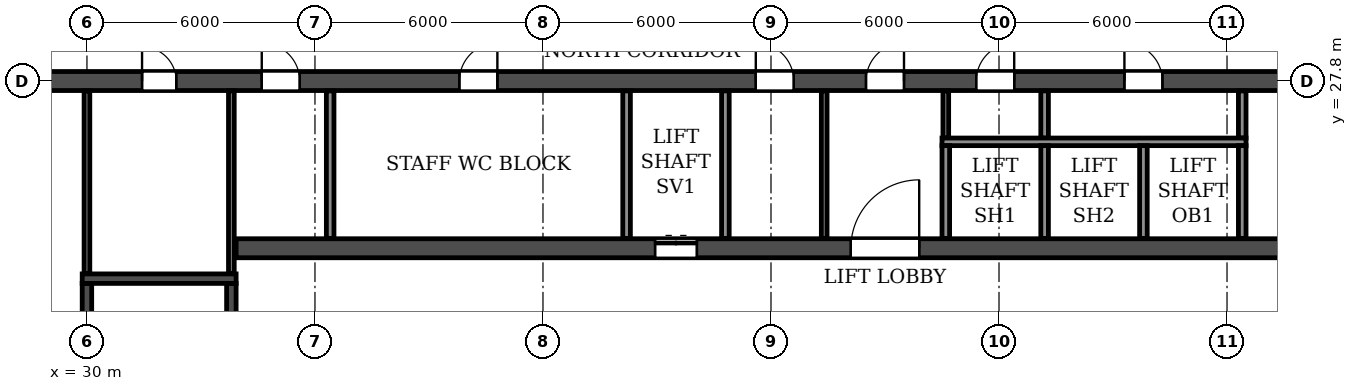
"""IFC4 building model, lengths in metres.
Left out: names, types, materials, properties, quantities, classifications, styles, units other than length and angle.
Written with IfcOpenShell. Run it as: python <this file> out.ifc"""

import sys

from ifc_helpers import new_model, si_unit, direction, frame, frame_2d, origin, place, context, subcontext, project, spatial, rectangle, extrude, element, fill, save


model = new_model("IFC4")
c1 = context("Model", 3, precision=1e-05, world=origin(), true_north=direction((0.0, 1.0)))
c2 = subcontext(c1, "Body", "Model", "MODEL_VIEW")
j1 = project(units=[si_unit("LENGTHUNIT", "METRE"), si_unit("PLANEANGLEUNIT", "RADIAN")], contexts=[c1])
p1 = place(None, origin())
s1 = spatial("IfcSite", under=j1, at=p1, CompositionType="ELEMENT")
p2 = place(p1, origin())
s2 = spatial("IfcBuilding", under=s1, at=p2, CompositionType="ELEMENT")
p3 = place(p2, frame((0.0, 0.0, 76.2)))
s3 = spatial("IfcBuildingStorey", under=s2, at=p3, CompositionType="ELEMENT", Elevation=76.2)
p4 = place(p3, frame((8.6, 27.8, 0.0), z_axis=(0.0, 0.0, 1.0), x_axis=(1.0, 0.0, 0.0)))
e1 = element("IfcWall", 1, at=p4, inside=s3, PredefinedType="SOLIDWALL", context=c2, shape_type="SweptSolid", body=[
    extrude(rectangle(XDim=84.8, YDim=0.5, at=frame_2d((42.4, 0.0))), origin(), (0.0, 0.0, 1.0), 3.06),
])
p5 = place(p4, frame((2.0, 0.0, 0.0)))
e2 = element("IfcOpeningElement", 2, at=p5, cuts=e1, PredefinedType="OPENING", context=c2, shape_type="SweptSolid", body=[
    extrude(rectangle(XDim=1.5, YDim=2.1, at=frame_2d((0.75, 1.05))), frame((0.0, 0.26, 0.0), z_axis=(0.0, -1.0, 0.0), x_axis=(1.0, 0.0, 0.0)), (0.0, 0.0, 1.0), 0.52),
])
p6 = place(p4, frame((6.95, 0.0, 0.0)))
e3 = element("IfcOpeningElement", 3, at=p6, cuts=e1, PredefinedType="OPENING", context=c2, shape_type="SweptSolid", body=[
    extrude(rectangle(XDim=1.0, YDim=2.1, at=frame_2d((0.5, 1.05))), frame((0.0, 0.26, 0.0), z_axis=(0.0, -1.0, 0.0), x_axis=(1.0, 0.0, 0.0)), (0.0, 0.0, 1.0), 0.52),
])
p7 = place(p4, frame((10.3, 0.0, 0.0)))
e4 = element("IfcOpeningElement", 4, at=p7, cuts=e1, PredefinedType="OPENING", context=c2, shape_type="SweptSolid", body=[
    extrude(rectangle(XDim=1.0, YDim=2.1, at=frame_2d((0.5, 1.05))), frame((0.0, 0.26, 0.0), z_axis=(0.0, -1.0, 0.0), x_axis=(1.0, 0.0, 0.0)), (0.0, 0.0, 1.0), 0.52),
])
p8 = place(p4, frame((13.65, 0.0, 0.0)))
e5 = element("IfcOpeningElement", 5, at=p8, cuts=e1, PredefinedType="OPENING", context=c2, shape_type="SweptSolid", body=[
    extrude(rectangle(XDim=0.9, YDim=2.1, at=frame_2d((0.45, 1.05))), frame((0.0, 0.26, 0.0), z_axis=(0.0, -1.0, 0.0), x_axis=(1.0, 0.0, 0.0)), (0.0, 0.0, 1.0), 0.52),
])
p9 = place(p4, frame((22.85, 0.0, 0.0)))
e6 = element("IfcOpeningElement", 6, at=p9, cuts=e1, PredefinedType="OPENING", context=c2, shape_type="SweptSolid", body=[
    extrude(rectangle(XDim=0.9, YDim=2.1, at=frame_2d((0.45, 1.05))), frame((0.0, 0.26, 0.0), z_axis=(0.0, -1.0, 0.0), x_axis=(1.0, 0.0, 0.0)), (0.0, 0.0, 1.0), 0.52),
])
p10 = place(p4, frame((26.0, 0.0, 0.0)))
e7 = element("IfcOpeningElement", 7, at=p10, cuts=e1, PredefinedType="OPENING", context=c2, shape_type="SweptSolid", body=[
    extrude(rectangle(XDim=1.0, YDim=2.1, at=frame_2d((0.5, 1.05))), frame((0.0, 0.26, 0.0), z_axis=(0.0, -1.0, 0.0), x_axis=(1.0, 0.0, 0.0)), (0.0, 0.0, 1.0), 0.52),
])
p11 = place(p4, frame((31.2, 0.0, 0.0)))
e8 = element("IfcOpeningElement", 8, at=p11, cuts=e1, PredefinedType="OPENING", context=c2, shape_type="SweptSolid", body=[
    extrude(rectangle(XDim=1.0, YDim=2.1, at=frame_2d((0.5, 1.05))), frame((0.0, 0.26, 0.0), z_axis=(0.0, -1.0, 0.0), x_axis=(1.0, 0.0, 0.0)), (0.0, 0.0, 1.0), 0.52),
])
p12 = place(p4, frame((39.0, 0.0, 0.0)))
e9 = element("IfcOpeningElement", 9, at=p12, cuts=e1, PredefinedType="OPENING", context=c2, shape_type="SweptSolid", body=[
    extrude(rectangle(XDim=1.0, YDim=2.1, at=frame_2d((0.5, 1.05))), frame((0.0, 0.26, 0.0), z_axis=(0.0, -1.0, 0.0), x_axis=(1.0, 0.0, 0.0)), (0.0, 0.0, 1.0), 0.52),
])
p13 = place(p4, frame((41.9, 0.0, 0.0)))
e10 = element("IfcOpeningElement", 10, at=p13, cuts=e1, PredefinedType="OPENING", context=c2, shape_type="SweptSolid", body=[
    extrude(rectangle(XDim=1.0, YDim=2.1, at=frame_2d((0.5, 1.05))), frame((0.0, 0.26, 0.0), z_axis=(0.0, -1.0, 0.0), x_axis=(1.0, 0.0, 0.0)), (0.0, 0.0, 1.0), 0.52),
])
p14 = place(p4, frame((44.8, 0.0, 0.0)))
e11 = element("IfcOpeningElement", 11, at=p14, cuts=e1, PredefinedType="OPENING", context=c2, shape_type="SweptSolid", body=[
    extrude(rectangle(XDim=1.0, YDim=2.1, at=frame_2d((0.5, 1.05))), frame((0.0, 0.26, 0.0), z_axis=(0.0, -1.0, 0.0), x_axis=(1.0, 0.0, 0.0)), (0.0, 0.0, 1.0), 0.52),
])
p15 = place(p4, frame((48.7, 0.0, 0.0)))
e12 = element("IfcOpeningElement", 12, at=p15, cuts=e1, PredefinedType="OPENING", context=c2, shape_type="SweptSolid", body=[
    extrude(rectangle(XDim=1.0, YDim=2.1, at=frame_2d((0.5, 1.05))), frame((0.0, 0.26, 0.0), z_axis=(0.0, -1.0, 0.0), x_axis=(1.0, 0.0, 0.0)), (0.0, 0.0, 1.0), 0.52),
])
p16 = place(p4, frame((55.2, 0.0, 0.0)))
e13 = element("IfcOpeningElement", 13, at=p16, cuts=e1, PredefinedType="OPENING", context=c2, shape_type="SweptSolid", body=[
    extrude(rectangle(XDim=1.0, YDim=2.1, at=frame_2d((0.5, 1.05))), frame((0.0, 0.26, 0.0), z_axis=(0.0, -1.0, 0.0), x_axis=(1.0, 0.0, 0.0)), (0.0, 0.0, 1.0), 0.52),
])
p17 = place(p4, frame((61.05, 0.0, 0.0)))
e14 = element("IfcOpeningElement", 14, at=p17, cuts=e1, PredefinedType="OPENING", context=c2, shape_type="SweptSolid", body=[
    extrude(rectangle(XDim=0.9, YDim=2.1, at=frame_2d((0.45, 1.05))), frame((0.0, 0.26, 0.0), z_axis=(0.0, -1.0, 0.0), x_axis=(1.0, 0.0, 0.0)), (0.0, 0.0, 1.0), 0.52),
])
p18 = place(p4, frame((70.25, 0.0, 0.0)))
e15 = element("IfcOpeningElement", 15, at=p18, cuts=e1, PredefinedType="OPENING", context=c2, shape_type="SweptSolid", body=[
    extrude(rectangle(XDim=0.9, YDim=2.1, at=frame_2d((0.45, 1.05))), frame((0.0, 0.26, 0.0), z_axis=(0.0, -1.0, 0.0), x_axis=(1.0, 0.0, 0.0)), (0.0, 0.0, 1.0), 0.52),
])
p19 = place(p4, frame((73.5, 0.0, 0.0)))
e16 = element("IfcOpeningElement", 16, at=p19, cuts=e1, PredefinedType="OPENING", context=c2, shape_type="SweptSolid", body=[
    extrude(rectangle(XDim=1.0, YDim=2.1, at=frame_2d((0.5, 1.05))), frame((0.0, 0.26, 0.0), z_axis=(0.0, -1.0, 0.0), x_axis=(1.0, 0.0, 0.0)), (0.0, 0.0, 1.0), 0.52),
])
p20 = place(p4, frame((76.25, 0.0, 0.0)))
e17 = element("IfcOpeningElement", 17, at=p20, cuts=e1, PredefinedType="OPENING", context=c2, shape_type="SweptSolid", body=[
    extrude(rectangle(XDim=1.0, YDim=2.1, at=frame_2d((0.5, 1.05))), frame((0.0, 0.26, 0.0), z_axis=(0.0, -1.0, 0.0), x_axis=(1.0, 0.0, 0.0)), (0.0, 0.0, 1.0), 0.52),
])
p21 = place(p4, frame((80.95, 0.0, 0.0)))
e18 = element("IfcOpeningElement", 18, at=p21, cuts=e1, PredefinedType="OPENING", context=c2, shape_type="SweptSolid", body=[
    extrude(rectangle(XDim=1.0, YDim=2.1, at=frame_2d((0.5, 1.05))), frame((0.0, 0.26, 0.0), z_axis=(0.0, -1.0, 0.0), x_axis=(1.0, 0.0, 0.0)), (0.0, 0.0, 1.0), 0.52),
])
p22 = place(p3, frame((33.925, 23.4, 0.0), z_axis=(0.0, 0.0, 1.0), x_axis=(1.0, 0.0, 0.0)))
e19 = element("IfcWall", 19, at=p22, inside=s3, PredefinedType="SOLIDWALL", context=c2, shape_type="SweptSolid", body=[
    extrude(rectangle(XDim=34.15, YDim=0.5, at=frame_2d((17.075, 0.0))), origin(), (0.0, 0.0, 1.0), 3.06),
])
p23 = place(p22, frame((16.175, 0.0, 0.0)))
e20 = element("IfcOpeningElement", 20, at=p23, cuts=e19, PredefinedType="OPENING", context=c2, shape_type="SweptSolid", body=[
    extrude(rectangle(XDim=1.8, YDim=2.1, at=frame_2d((0.9, 1.05))), frame((0.0, 0.26, 0.0), z_axis=(0.0, -1.0, 0.0), x_axis=(1.0, 0.0, 0.0)), (0.0, 0.0, 1.0), 0.52),
])
p24 = place(p22, frame((11.025, 0.0, 0.0)))
e21 = element("IfcOpeningElement", 21, at=p24, cuts=e19, PredefinedType="OPENING", context=c2, shape_type="SweptSolid", body=[
    extrude(rectangle(XDim=1.1, YDim=2.1, at=frame_2d((0.55, 1.05))), frame((0.0, 0.26, 0.0), z_axis=(0.0, -1.0, 0.0), x_axis=(1.0, 0.0, 0.0)), (0.0, 0.0, 1.0), 0.52),
])
p25 = place(p3, frame((30.0, 14.85, 0.0), z_axis=(0.0, 0.0, 1.0), x_axis=(0.0, 1.0, 0.0)))
e22 = element("IfcWall", 22, at=p25, inside=s3, PredefinedType="SOLIDWALL", context=c2, shape_type="SweptSolid", body=[
    extrude(rectangle(XDim=7.625, YDim=0.25, at=frame_2d((3.812, 0.0))), origin(), (0.0, 0.0, 1.0), 3.06),
])
p26 = place(p3, frame((33.8, 14.85, 0.0), z_axis=(0.0, 0.0, 1.0), x_axis=(0.0, 1.0, 0.0)))
e23 = element("IfcWall", 23, at=p26, inside=s3, PredefinedType="SOLIDWALL", context=c2, shape_type="SweptSolid", body=[
    extrude(rectangle(XDim=7.625, YDim=0.25, at=frame_2d((3.812, 0.0))), origin(), (0.0, 0.0, 1.0), 3.06),
])
p27 = place(p26, frame((0.45, 0.0, 0.0)))
e24 = element("IfcOpeningElement", 24, at=p27, cuts=e23, PredefinedType="OPENING", context=c2, shape_type="SweptSolid", body=[
    extrude(rectangle(XDim=1.0, YDim=2.1, at=frame_2d((0.5, 1.05))), frame((0.0, 0.135, 0.0), z_axis=(0.0, -1.0, 0.0), x_axis=(1.0, 0.0, 0.0)), (0.0, 0.0, 1.0), 0.27),
])
p28 = place(p3, frame((29.875, 22.6, 0.0), z_axis=(0.0, 0.0, 1.0), x_axis=(1.0, 0.0, 0.0)))
e25 = element("IfcWall", 25, at=p28, inside=s3, PredefinedType="SOLIDWALL", context=c2, shape_type="SweptSolid", body=[
    extrude(rectangle(XDim=4.05, YDim=0.25, at=frame_2d((2.025, 0.0))), origin(), (0.0, 0.0, 1.0), 3.06),
])
p29 = place(p3, frame((49.4, 23.66, 0.0), z_axis=(0.0, 0.0, 1.0), x_axis=(0.0, 1.0, 0.0)))
e26 = element("IfcWall", 26, at=p29, inside=s3, PredefinedType="PARTITIONING", context=c2, shape_type="SweptSolid", body=[
    extrude(rectangle(XDim=3.88, YDim=0.15, at=frame_2d((1.94, 0.0))), origin(), (0.0, 0.0, 1.0), 3.06),
])
p30 = place(p3, frame((52.6, 26.3, 0.0), z_axis=(0.0, 0.0, 1.0), x_axis=(0.0, 1.0, 0.0)))
e27 = element("IfcWall", 27, at=p30, inside=s3, PredefinedType="PARTITIONING", context=c2, shape_type="SweptSolid", body=[
    extrude(rectangle(XDim=1.24, YDim=0.15, at=frame_2d((0.62, 0.0))), origin(), (0.0, 0.0, 1.0), 3.06),
])
p31 = place(p3, frame((36.4, 23.66, 0.0), z_axis=(0.0, 0.0, 1.0), x_axis=(0.0, 1.0, 0.0)))
e28 = element("IfcWall", 28, at=p31, inside=s3, PredefinedType="PARTITIONING", context=c2, shape_type="SweptSolid", body=[
    extrude(rectangle(XDim=3.88, YDim=0.2, at=frame_2d((1.94, 0.0))), origin(), (0.0, 0.0, 1.0), 3.06),
])
for number, where, z_axis, x_axis in (
    (29, (55.2, 26.3, 0.0), (0.0, 0.0, 1.0), (0.0, 1.0, 0.0)),
    (30, (60.4, 26.3, 0.0), (0.0, 0.0, 1.0), (0.0, 1.0, 0.0)),
):
    element("IfcWall", number, at=place(p3, frame(where, z_axis=z_axis, x_axis=x_axis)), inside=s3, PredefinedType="PARTITIONING", context=c2, shape_type="SweptSolid", body=[
        extrude(rectangle(XDim=1.24, YDim=0.2, at=frame_2d((0.62, 0.0))), origin(), (0.0, 0.0, 1.0), 3.06),
    ])
for number, where, z_axis, x_axis in (
    (31, (30.0, 22.735, 0.0), (0.0, 0.0, 1.0), (0.0, 1.0, 0.0)),
    (32, (33.8, 22.735, 0.0), (0.0, 0.0, 1.0), (0.0, 1.0, 0.0)),
):
    element("IfcWall", number, at=place(p3, frame(where, z_axis=z_axis, x_axis=x_axis)), inside=s3, PredefinedType="PARTITIONING", context=c2, shape_type="SweptSolid", body=[
        extrude(rectangle(XDim=4.805, YDim=0.15, at=frame_2d((2.402, 0.0))), origin(), (0.0, 0.0, 1.0), 3.06),
    ])
p32 = place(p3, frame((52.5, 26.2, 0.0), z_axis=(0.0, 0.0, 1.0), x_axis=(1.0, 0.0, 0.0)))
e33 = element("IfcWall", 33, at=p32, inside=s3, PredefinedType="PARTITIONING", context=c2, shape_type="SweptSolid", body=[
    extrude(rectangle(XDim=8.0, YDim=0.2, at=frame_2d((4.0, 0.0))), origin(), (0.0, 0.0, 1.0), 3.06),
])
for number, where, z_axis, x_axis in (
    (34, (44.2, 23.66, 0.0), (0.0, 0.0, 1.0), (0.0, 1.0, 0.0)),
    (35, (46.8, 23.66, 0.0), (0.0, 0.0, 1.0), (0.0, 1.0, 0.0)),
):
    element("IfcWall", number, at=place(p3, frame(where, z_axis=z_axis, x_axis=x_axis)), inside=s3, PredefinedType="PARTITIONING", context=c2, shape_type="SweptSolid", body=[
        extrude(rectangle(XDim=3.88, YDim=0.2, at=frame_2d((1.94, 0.0))), origin(), (0.0, 0.0, 1.0), 3.06),
    ])
for number, where, z_axis, x_axis in (
    (36, (52.6, 23.66, 0.0), (0.0, 0.0, 1.0), (0.0, 1.0, 0.0)),
    (37, (55.2, 23.66, 0.0), (0.0, 0.0, 1.0), (0.0, 1.0, 0.0)),
    (38, (57.8, 23.66, 0.0), (0.0, 0.0, 1.0), (0.0, 1.0, 0.0)),
    (39, (60.4, 23.66, 0.0), (0.0, 0.0, 1.0), (0.0, 1.0, 0.0)),
):
    element("IfcWall", number, at=place(p3, frame(where, z_axis=z_axis, x_axis=x_axis)), inside=s3, PredefinedType="PARTITIONING", context=c2, shape_type="SweptSolid", body=[
        extrude(rectangle(XDim=2.44, YDim=0.2, at=frame_2d((1.22, 0.0))), origin(), (0.0, 0.0, 1.0), 3.06),
    ])
p33 = place(p9, origin())
e40 = element("IfcDoor", 40, at=p33, inside=s3, OperationType="SINGLE_SWING_LEFT", PredefinedType="DOOR", context=c2, shape_type="SweptSolid", body=[
    extrude(rectangle(XDim=0.9, YDim=2.1, at=frame_2d((0.45, 1.05))), frame((0.0, 0.025, 0.0), z_axis=(0.0, -1.0, 0.0), x_axis=(1.0, 0.0, 0.0)), (0.0, 0.0, 1.0), 0.05),
])
fill(e6, e40)
p34 = place(p10, origin())
e41 = element("IfcDoor", 41, at=p34, inside=s3, OperationType="SINGLE_SWING_LEFT", PredefinedType="DOOR", context=c2, shape_type="SweptSolid", body=[
    extrude(rectangle(XDim=1.0, YDim=2.1, at=frame_2d((0.5, 1.05))), frame((0.0, 0.025, 0.0), z_axis=(0.0, -1.0, 0.0), x_axis=(1.0, 0.0, 0.0)), (0.0, 0.0, 1.0), 0.05),
])
fill(e7, e41)
p35 = place(p11, origin())
e42 = element("IfcDoor", 42, at=p35, inside=s3, OperationType="SINGLE_SWING_RIGHT", PredefinedType="DOOR", context=c2, shape_type="SweptSolid", body=[
    extrude(rectangle(XDim=1.0, YDim=2.1, at=frame_2d((0.5, 1.05))), frame((0.0, 0.025, 0.0), z_axis=(0.0, -1.0, 0.0), x_axis=(1.0, 0.0, 0.0)), (0.0, 0.0, 1.0), 0.05),
])
fill(e8, e42)
p36 = place(p12, origin())
e43 = element("IfcDoor", 43, at=p36, inside=s3, OperationType="SINGLE_SWING_LEFT", PredefinedType="DOOR", context=c2, shape_type="SweptSolid", body=[
    extrude(rectangle(XDim=1.0, YDim=2.1, at=frame_2d((0.5, 1.05))), frame((0.0, 0.025, 0.0), z_axis=(0.0, -1.0, 0.0), x_axis=(1.0, 0.0, 0.0)), (0.0, 0.0, 1.0), 0.05),
])
fill(e9, e43)
p37 = place(p13, origin())
e44 = element("IfcDoor", 44, at=p37, inside=s3, OperationType="SINGLE_SWING_RIGHT", PredefinedType="DOOR", context=c2, shape_type="SweptSolid", body=[
    extrude(rectangle(XDim=1.0, YDim=2.1, at=frame_2d((0.5, 1.05))), frame((0.0, 0.025, 0.0), z_axis=(0.0, -1.0, 0.0), x_axis=(1.0, 0.0, 0.0)), (0.0, 0.0, 1.0), 0.05),
])
fill(e10, e44)
p38 = place(p14, origin())
e45 = element("IfcDoor", 45, at=p38, inside=s3, OperationType="SINGLE_SWING_RIGHT", PredefinedType="DOOR", context=c2, shape_type="SweptSolid", body=[
    extrude(rectangle(XDim=1.0, YDim=2.1, at=frame_2d((0.5, 1.05))), frame((0.0, 0.025, 0.0), z_axis=(0.0, -1.0, 0.0), x_axis=(1.0, 0.0, 0.0)), (0.0, 0.0, 1.0), 0.05),
])
fill(e11, e45)
p39 = place(p15, origin())
e46 = element("IfcDoor", 46, at=p39, inside=s3, OperationType="SINGLE_SWING_LEFT", PredefinedType="DOOR", context=c2, shape_type="SweptSolid", body=[
    extrude(rectangle(XDim=1.0, YDim=2.1, at=frame_2d((0.5, 1.05))), frame((0.0, 0.025, 0.0), z_axis=(0.0, -1.0, 0.0), x_axis=(1.0, 0.0, 0.0)), (0.0, 0.0, 1.0), 0.05),
])
fill(e12, e46)
p40 = place(p23, origin())
e47 = element("IfcDoor", 47, at=p40, inside=s3, OperationType="DOUBLE_DOOR_SINGLE_SWING", PredefinedType="DOOR", context=c2, shape_type="SweptSolid", body=[
    extrude(rectangle(XDim=1.8, YDim=2.1, at=frame_2d((0.9, 1.05))), frame((0.0, 0.025, 0.0), z_axis=(0.0, -1.0, 0.0), x_axis=(1.0, 0.0, 0.0)), (0.0, 0.0, 1.0), 0.05),
])
fill(e20, e47)
p41 = place(p24, origin())
e48 = element("IfcDoor", 48, at=p41, inside=s3, OperationType="DOUBLE_DOOR_SLIDING", PredefinedType="DOOR", context=c2, shape_type="SweptSolid", body=[
    extrude(rectangle(XDim=1.1, YDim=2.1, at=frame_2d((0.55, 1.05))), frame((0.0, 0.025, 0.0), z_axis=(0.0, -1.0, 0.0), x_axis=(1.0, 0.0, 0.0)), (0.0, 0.0, 1.0), 0.05),
])
fill(e21, e48)
save(model, sys.argv[1])
